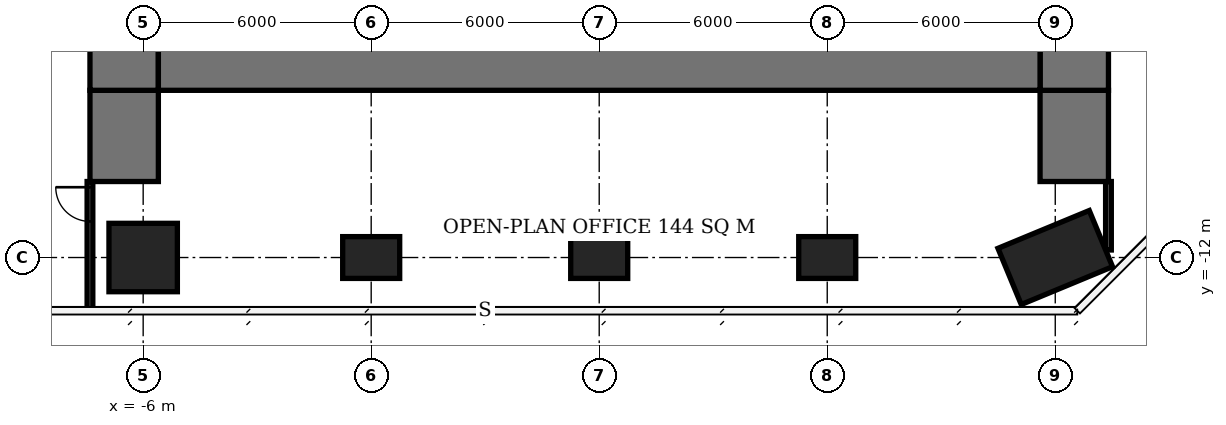
"""IFC4 building model, lengths in metres.
Left out: names, types, materials, properties, quantities, classifications, styles, units other than length and angle.
Written with IfcOpenShell. Run it as: python <this file> out.ifc"""

import sys

from ifc_helpers import new_model, si_unit, direction, frame, frame_2d, origin, origin_2d, place, context, subcontext, project, spatial, rectangle, extrude, element, fill, save


model = new_model("IFC4")
c1 = context("Model", 3, precision=1e-05, world=origin(), true_north=direction((0.0, 1.0)))
c2 = subcontext(c1, "Body", "Model", "MODEL_VIEW")
j1 = project(units=[si_unit("LENGTHUNIT", "METRE"), si_unit("PLANEANGLEUNIT", "RADIAN")], contexts=[c1])
p1 = place(None, origin())
s1 = spatial("IfcSite", under=j1, at=p1, CompositionType="ELEMENT")
p2 = place(p1, origin())
s2 = spatial("IfcBuilding", under=s1, at=p2, CompositionType="ELEMENT")
p3 = place(p2, frame((0.0, 0.0, 200.6)))
s3 = spatial("IfcBuildingStorey", under=s2, at=p3, CompositionType="ELEMENT", Elevation=200.6)
p4 = place(p3, frame((-6.0, -12.0, 0.0), z_axis=(0.0, 0.0, 1.0), x_axis=(1.0, 0.0, 0.0)))
e1 = element("IfcColumn", 1, at=p4, inside=s3, PredefinedType="COLUMN", context=c2, shape_type="SweptSolid", body=[
    extrude(rectangle(XDim=1.8, YDim=1.8, at=origin_2d()), origin(), (0.0, 0.0, 1.0), 3.9),
])
for number, where, z_axis, x_axis in (
    (2, (0.0, -12.0, 0.0), (0.0, 0.0, 1.0), (1.0, 0.0, 0.0)),
    (3, (6.0, -12.0, 0.0), (0.0, 0.0, 1.0), (1.0, 0.0, 0.0)),
    (4, (12.0, -12.0, 0.0), (0.0, 0.0, 1.0), (1.0, 0.0, 0.0)),
):
    element("IfcColumn", number, at=place(p3, frame(where, z_axis=z_axis, x_axis=x_axis)), inside=s3, PredefinedType="COLUMN", context=c2, shape_type="SweptSolid", body=[
        extrude(rectangle(XDim=1.5, YDim=1.1, at=origin_2d()), origin(), (0.0, 0.0, 1.0), 3.9),
    ])
p5 = place(p3, frame((18.0, -12.0, 0.0), z_axis=(0.0, 0.0, 1.0), x_axis=(-0.923879532511, -0.382683432365, 0.0)))
e5 = element("IfcColumn", 5, at=p5, inside=s3, PredefinedType="COLUMN", context=c2, shape_type="SweptSolid", body=[
    extrude(rectangle(XDim=2.6, YDim=1.6, at=origin_2d()), origin(), (0.0, 0.0, 1.0), 3.9),
])
p6 = place(p3, frame((-5.6, -6.6, 0.0), z_axis=(0.0, 0.0, 1.0), x_axis=(1.0, 0.0, 0.0)))
e6 = element("IfcWall", 6, at=p6, inside=s3, PredefinedType="SHEAR", context=c2, shape_type="SweptSolid", body=[
    extrude(rectangle(XDim=23.2, YDim=2.0, at=frame_2d((11.6, 0.0))), origin(), (0.0, 0.0, 1.0), 3.9),
])
p7 = place(p3, frame((-6.5, -7.6, 0.0), z_axis=(0.0, 0.0, 1.0), x_axis=(0.0, 1.0, 0.0)))
e7 = element("IfcWall", 7, at=p7, inside=s3, PredefinedType="SHEAR", context=c2, shape_type="SweptSolid", body=[
    extrude(rectangle(XDim=21.2, YDim=1.8, at=frame_2d((10.6, 0.0))), origin(), (0.0, 0.0, 1.0), 3.9),
])
p8 = place(p7, frame((7.8, 0.0, 0.0)))
e8 = element("IfcOpeningElement", 8, at=p8, cuts=e7, PredefinedType="OPENING", context=c2, shape_type="SweptSolid", body=[
    extrude(rectangle(XDim=1.8, YDim=2.4, at=frame_2d((0.9, 1.2))), frame((0.0, 0.91, 0.0), z_axis=(0.0, -1.0, 0.0), x_axis=(1.0, 0.0, 0.0)), (0.0, 0.0, 1.0), 1.82),
])
p9 = place(p3, frame((18.5, -7.6, 0.0), z_axis=(0.0, 0.0, 1.0), x_axis=(0.0, 1.0, 0.0)))
e9 = element("IfcWall", 9, at=p9, inside=s3, PredefinedType="SHEAR", context=c2, shape_type="SweptSolid", body=[
    extrude(rectangle(XDim=21.2, YDim=1.8, at=frame_2d((10.6, 0.0))), origin(), (0.0, 0.0, 1.0), 3.9),
])
p10 = place(p9, frame((9.2, 0.0, 0.0)))
e10 = element("IfcOpeningElement", 10, at=p10, cuts=e9, PredefinedType="OPENING", context=c2, shape_type="SweptSolid", body=[
    extrude(rectangle(XDim=1.8, YDim=2.4, at=frame_2d((0.9, 1.2))), frame((0.0, 0.91, 0.0), z_axis=(0.0, -1.0, 0.0), x_axis=(1.0, 0.0, 0.0)), (0.0, 0.0, 1.0), 1.82),
])
for number, where, z_axis, x_axis in (
    (11, (-6.5, -10.0, 0.0), (0.0, 0.0, 1.0), (0.0, 1.0, 0.0)),
    (12, (18.5, -10.0, 0.0), (0.0, 0.0, 1.0), (0.0, 1.0, 0.0)),
):
    element("IfcWall", number, at=place(p3, frame(where, z_axis=z_axis, x_axis=x_axis)), inside=s3, PredefinedType="SHEAR", context=c2, shape_type="SweptSolid", body=[
        extrude(rectangle(XDim=2.4, YDim=1.8, at=frame_2d((1.2, 0.0))), origin(), (0.0, 0.0, 1.0), 3.9),
    ])
p11 = place(p3, frame((-7.4, -13.4, 0.0), z_axis=(0.0, 0.0, 1.0), x_axis=(0.0, 1.0, 0.0)))
e13 = element("IfcWall", 13, at=p11, inside=s3, PredefinedType="PARTITIONING", context=c2, shape_type="SweptSolid", body=[
    extrude(rectangle(XDim=3.4, YDim=0.15, at=frame_2d((1.7, 0.0))), origin(), (0.0, 0.0, 1.0), 3.65),
])
p12 = place(p11, frame((2.35, 0.0, 0.0)))
e14 = element("IfcOpeningElement", 14, at=p12, cuts=e13, PredefinedType="OPENING", context=c2, shape_type="SweptSolid", body=[
    extrude(rectangle(XDim=0.9, YDim=2.1, at=frame_2d((0.45, 1.05))), frame((0.0, 0.085, 0.0), z_axis=(0.0, -1.0, 0.0), x_axis=(1.0, 0.0, 0.0)), (0.0, 0.0, 1.0), 0.17),
])
p13 = place(p3, frame((19.4, -11.802, 0.0), z_axis=(0.0, 0.0, 1.0), x_axis=(0.0, 1.0, 0.0)))
e15 = element("IfcWall", 15, at=p13, inside=s3, PredefinedType="PARTITIONING", context=c2, shape_type="SweptSolid", body=[
    extrude(rectangle(XDim=1.802, YDim=0.15, at=frame_2d((0.901, 0.0))), origin(), (0.0, 0.0, 1.0), 3.65),
])
p14 = place(p12, origin())
e16 = element("IfcDoor", 16, at=p14, inside=s3, OperationType="SINGLE_SWING_RIGHT", PredefinedType="DOOR", context=c2, shape_type="SweptSolid", body=[
    extrude(rectangle(XDim=0.9, YDim=2.1, at=frame_2d((0.45, 1.05))), frame((0.0, 0.025, 0.0), z_axis=(0.0, -1.0, 0.0), x_axis=(1.0, 0.0, 0.0)), (0.0, 0.0, 1.0), 0.05),
])
fill(e14, e16)
save(model, sys.argv[1])
